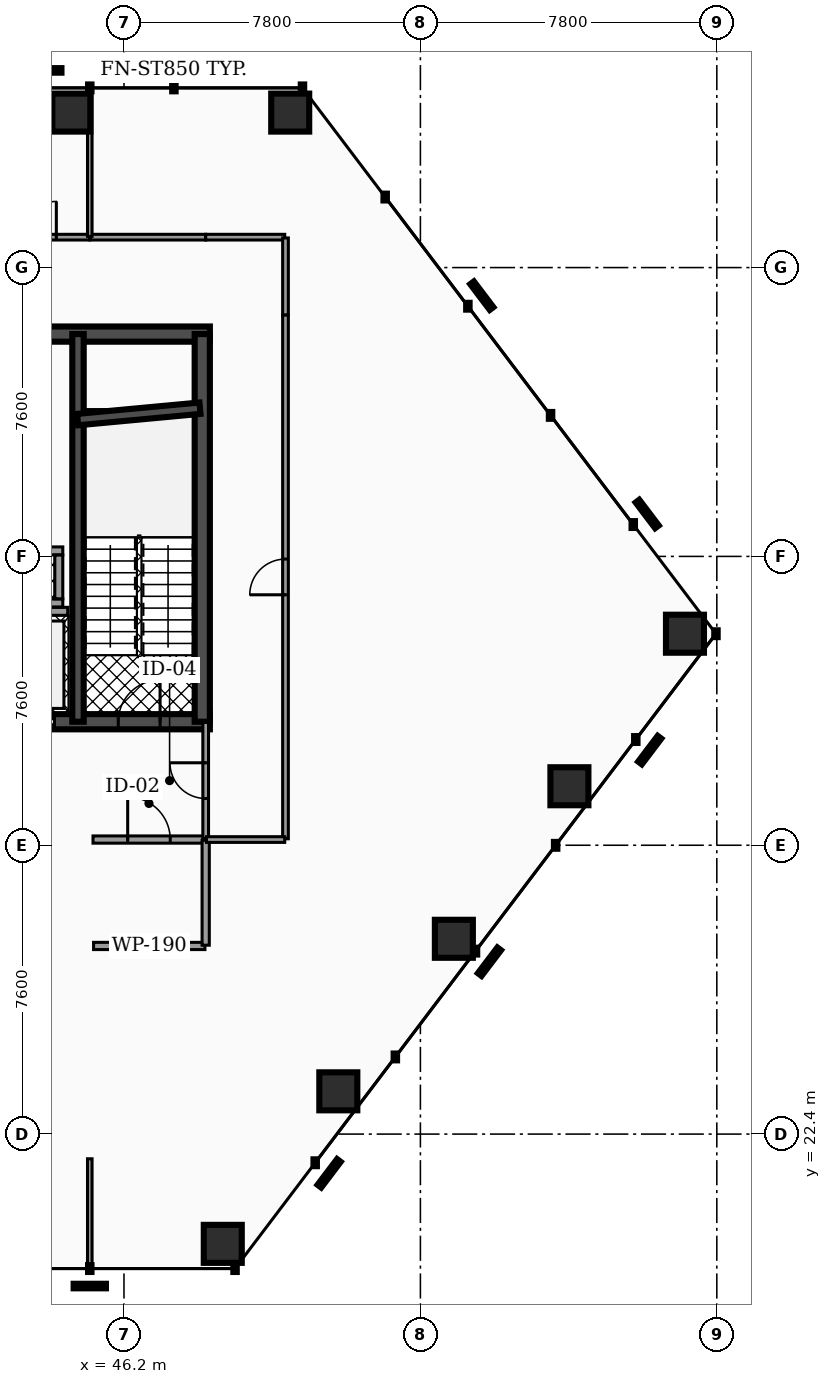
"""IFC4 building model, lengths in metres.
Left out: names, types, materials, properties, quantities, classifications, styles, units other than length and angle.
Written with IfcOpenShell. Run it as: python <this file> out.ifc"""

import sys

from ifc_helpers import new_model, si_unit, direction, frame, frame_2d, origin, origin_2d, place, context, subcontext, project, spatial, rectangle, hollow_rectangle, extrude, element, fill, save


model = new_model("IFC4")
c1 = context("Model", 3, precision=1e-05, world=origin(), true_north=direction((0.0, 1.0)))
c2 = subcontext(c1, "Body", "Model", "MODEL_VIEW")
j1 = project(units=[si_unit("LENGTHUNIT", "METRE"), si_unit("PLANEANGLEUNIT", "RADIAN")], contexts=[c1])
p1 = place(None, origin())
s1 = spatial("IfcSite", under=j1, at=p1, CompositionType="ELEMENT")
p2 = place(p1, origin())
s2 = spatial("IfcBuilding", under=s1, at=p2, CompositionType="ELEMENT")
p3 = place(p2, frame((0.0, 0.0, 52.02)))
s3 = spatial("IfcBuildingStorey", under=s2, at=p3, CompositionType="ELEMENT", Elevation=52.02)
p4 = place(p3, frame((28.4, 43.45, 0.0), z_axis=(0.0, 0.0, 1.0), x_axis=(1.0, 0.0, 0.0)))
e1 = element("IfcWall", 1, at=p4, inside=s3, PredefinedType="SHEAR", context=c2, shape_type="SweptSolid", body=[
    extrude(rectangle(XDim=20.06, YDim=0.4, at=frame_2d((10.03, 0.0))), origin(), (0.0, 0.0, 1.0), 3.82),
])
p5 = place(p3, frame((28.4, 33.25, 0.0), z_axis=(0.0, 0.0, 1.0), x_axis=(1.0, 0.0, 0.0)))
e2 = element("IfcWall", 2, at=p5, inside=s3, PredefinedType="SHEAR", context=c2, shape_type="SweptSolid", body=[
    extrude(rectangle(XDim=20.06, YDim=0.4, at=frame_2d((10.03, 0.0))), origin(), (0.0, 0.0, 1.0), 3.82),
])
p6 = place(p5, frame((4.03, 0.0, 0.0)))
e3 = element("IfcOpeningElement", 3, at=p6, cuts=e2, PredefinedType="OPENING", context=c2, shape_type="SweptSolid", body=[
    extrude(rectangle(XDim=1.1, YDim=2.15, at=frame_2d((0.55, 1.075))), frame((0.0, 0.21, 0.0), z_axis=(0.0, -1.0, 0.0), x_axis=(1.0, 0.0, 0.0)), (0.0, 0.0, 1.0), 0.42),
])
p7 = place(p5, frame((14.87, 0.0, 0.0)))
e4 = element("IfcOpeningElement", 4, at=p7, cuts=e2, PredefinedType="OPENING", context=c2, shape_type="SweptSolid", body=[
    extrude(rectangle(XDim=1.1, YDim=2.15, at=frame_2d((0.55, 1.075))), frame((0.0, 0.21, 0.0), z_axis=(0.0, -1.0, 0.0), x_axis=(1.0, 0.0, 0.0)), (0.0, 0.0, 1.0), 0.42),
])
p8 = place(p5, frame((1.31, 0.0, 0.0)))
e5 = element("IfcOpeningElement", 5, at=p8, cuts=e2, PredefinedType="OPENING", context=c2, shape_type="SweptSolid", body=[
    extrude(rectangle(XDim=1.1, YDim=2.2, at=frame_2d((0.55, 1.1))), frame((0.0, 0.21, 0.0), z_axis=(0.0, -1.0, 0.0), x_axis=(1.0, 0.0, 0.0)), (0.0, 0.0, 1.0), 0.42),
])
p9 = place(p5, frame((9.44, 0.0, 0.0)))
e6 = element("IfcOpeningElement", 6, at=p9, cuts=e2, PredefinedType="OPENING", context=c2, shape_type="SweptSolid", body=[
    extrude(rectangle(XDim=1.12, YDim=2.05, at=frame_2d((0.56, 1.025))), frame((0.0, 0.21, 0.0), z_axis=(0.0, -1.0, 0.0), x_axis=(1.0, 0.0, 0.0)), (0.0, 0.0, 1.0), 0.42),
])
p10 = place(p5, frame((17.65, 0.0, 0.0)))
e7 = element("IfcOpeningElement", 7, at=p10, cuts=e2, PredefinedType="OPENING", context=c2, shape_type="SweptSolid", body=[
    extrude(rectangle(XDim=1.1, YDim=2.2, at=frame_2d((0.55, 1.1))), frame((0.0, 0.21, 0.0), z_axis=(0.0, -1.0, 0.0), x_axis=(1.0, 0.0, 0.0)), (0.0, 0.0, 1.0), 0.42),
])
p11 = place(p3, frame((44.99, 33.25, 0.0), z_axis=(0.0, 0.0, 1.0), x_axis=(0.0, 1.0, 0.0)))
e8 = element("IfcWall", 8, at=p11, inside=s3, PredefinedType="SHEAR", context=c2, shape_type="SweptSolid", body=[
    extrude(rectangle(XDim=10.2, YDim=0.3, at=frame_2d((5.1, 0.0))), origin(), (0.0, 0.0, 1.0), 3.82),
])
p12 = place(p3, frame((48.26, 33.25, 0.0), z_axis=(0.0, 0.0, 1.0), x_axis=(0.0, 1.0, 0.0)))
e9 = element("IfcWall", 9, at=p12, inside=s3, PredefinedType="SHEAR", context=c2, shape_type="SweptSolid", body=[
    extrude(rectangle(XDim=10.2, YDim=0.4, at=frame_2d((5.1, 0.0))), origin(), (0.0, 0.0, 1.0), 3.82),
])
p13 = place(p3, frame((44.98, 41.2, 0.0), z_axis=(0.0, 0.0, 1.0), x_axis=(0.995686468965, 0.09278176286, 0.0)))
e10 = element("IfcWall", 10, at=p13, inside=s3, PredefinedType="SHEAR", context=c2, shape_type="SweptSolid", body=[
    extrude(rectangle(XDim=3.234, YDim=0.3, at=frame_2d((1.617, 0.0))), origin(), (0.0, 0.0, 1.0), 3.82),
])
for number, where, z_axis, x_axis in (
    (11, (50.574, 49.278, 0.0), (0.0, 0.0, 1.0), (1.0, 0.0, 0.0)),
    (12, (44.814, 49.278, 0.0), (0.0, 0.0, 1.0), (1.0, 0.0, 0.0)),
    (13, (48.8, 19.512, 0.0), (0.0, 0.0, 1.0), (1.0, 0.0, 0.0)),
    (14, (51.84, 23.525, 0.0), (0.0, 0.0, 1.0), (1.0, 0.0, 0.0)),
    (15, (54.881, 27.539, 0.0), (0.0, 0.0, 1.0), (1.0, 0.0, 0.0)),
    (16, (57.921, 31.552, 0.0), (0.0, 0.0, 1.0), (1.0, 0.0, 0.0)),
    (17, (60.962, 35.566, 0.0), (0.0, 0.0, 1.0), (1.0, 0.0, 0.0)),
):
    element("IfcColumn", number, at=place(p3, frame(where, z_axis=z_axis, x_axis=x_axis)), inside=s3, PredefinedType="COLUMN", context=c2, shape_type="SweptSolid", body=[
        extrude(hollow_rectangle(XDim=1.0, YDim=1.0, WallThickness=0.05, at=origin_2d()), origin(), (0.0, 0.0, 1.0), 3.82),
    ])
p14 = place(p3, frame((42.92, 36.155, 0.0), z_axis=(0.0, 0.0, 1.0), x_axis=(1.0, 0.0, 0.0)))
e18 = element("IfcWall", 18, at=p14, inside=s3, PredefinedType="SOLIDWALL", context=c2, shape_type="SweptSolid", body=[
    extrude(rectangle(XDim=1.8, YDim=0.21, at=frame_2d((0.9, 0.0))), origin(), (0.0, 0.0, 1.0), 2.792),
])
for number, where, z_axis, x_axis in (
    (19, (42.99, 36.375, 0.0), (0.0, 0.0, 1.0), (1.0, 0.0, 0.0)),
    (20, (42.99, 37.745, 0.0), (0.0, 0.0, 1.0), (1.0, 0.0, 0.0)),
):
    element("IfcWall", number, at=place(p3, frame(where, z_axis=z_axis, x_axis=x_axis)), inside=s3, PredefinedType="SOLIDWALL", context=c2, shape_type="SweptSolid", body=[
        extrude(rectangle(XDim=1.6, YDim=0.21, at=frame_2d((0.8, 0.0))), origin(), (0.0, 0.0, 1.0), 3.82),
    ])
p15 = place(p3, frame((44.485, 36.485, 0.0), z_axis=(0.0, 0.0, 1.0), x_axis=(0.0, 1.0, 0.0)))
e21 = element("IfcWall", 21, at=p15, inside=s3, PredefinedType="SOLIDWALL", context=c2, shape_type="SweptSolid", body=[
    extrude(rectangle(XDim=1.15, YDim=0.21, at=frame_2d((0.575, 0.0))), origin(), (0.0, 0.0, 1.0), 3.82),
])
p16 = place(p3, frame((45.385, 30.15, 0.0), z_axis=(0.0, 0.0, 1.0), x_axis=(1.0, 0.0, 0.0)))
e22 = element("IfcWall", 22, at=p16, inside=s3, PredefinedType="PARTITIONING", context=c2, shape_type="SweptSolid", body=[
    extrude(rectangle(XDim=2.945, YDim=0.19, at=frame_2d((1.473, 0.0))), origin(), (0.0, 0.0, 1.0), 2.777),
])
p17 = place(p16, frame((0.913, 0.0, 0.0)))
e23 = element("IfcOpeningElement", 23, at=p17, cuts=e22, PredefinedType="OPENING", context=c2, shape_type="SweptSolid", body=[
    extrude(rectangle(XDim=1.12, YDim=2.05, at=frame_2d((0.56, 1.025))), frame((0.0, 0.105, 0.0), z_axis=(0.0, -1.0, 0.0), x_axis=(1.0, 0.0, 0.0)), (0.0, 0.0, 1.0), 0.21),
])
p18 = place(p3, frame((48.35, 30.17, 0.0), z_axis=(0.0, 0.0, 1.0), x_axis=(0.0, 1.0, 0.0)))
e24 = element("IfcWall", 24, at=p18, inside=s3, PredefinedType="PARTITIONING", context=c2, shape_type="SweptSolid", body=[
    extrude(rectangle(XDim=3.06, YDim=0.15, at=frame_2d((1.53, 0.0))), origin(), (0.0, 0.0, 1.0), 2.777),
])
p19 = place(p18, frame((1.06, 0.0, 0.0)))
e25 = element("IfcOpeningElement", 25, at=p19, cuts=e24, PredefinedType="OPENING", context=c2, shape_type="SweptSolid", body=[
    extrude(rectangle(XDim=0.94, YDim=2.05, at=frame_2d((0.47, 1.025))), frame((0.0, 0.085, 0.0), z_axis=(0.0, -1.0, 0.0), x_axis=(1.0, 0.0, 0.0)), (0.0, 0.0, 1.0), 0.17),
])
p20 = place(p3, frame((45.4, 27.35, 0.0), z_axis=(0.0, 0.0, 1.0), x_axis=(1.0, 0.0, 0.0)))
e26 = element("IfcWall", 26, at=p20, inside=s3, PredefinedType="PARTITIONING", context=c2, shape_type="SweptSolid", body=[
    extrude(rectangle(XDim=2.93, YDim=0.19, at=frame_2d((1.465, 0.0))), origin(), (0.0, 0.0, 1.0), 2.777),
])
p21 = place(p3, frame((48.35, 27.37, 0.0), z_axis=(0.0, 0.0, 1.0), x_axis=(0.0, 1.0, 0.0)))
e27 = element("IfcWall", 27, at=p21, inside=s3, PredefinedType="PARTITIONING", context=c2, shape_type="SweptSolid", body=[
    extrude(rectangle(XDim=2.76, YDim=0.19, at=frame_2d((1.38, 0.0))), origin(), (0.0, 0.0, 1.0), 2.777),
])
p22 = place(p3, frame((45.305, 46.0, 0.0), z_axis=(0.0, 0.0, 1.0), x_axis=(1.0, 0.0, 0.0)))
e28 = element("IfcWall", 28, at=p22, inside=s3, PredefinedType="PARTITIONING", context=c2, shape_type="SweptSolid", body=[
    extrude(rectangle(XDim=3.045, YDim=0.15, at=frame_2d((1.522, 0.0))), origin(), (0.0, 0.0, 1.0), 2.777),
])
p23 = place(p3, frame((48.35, 46.0, 0.0), z_axis=(0.0, 0.0, 1.0), x_axis=(1.0, 0.0, 0.0)))
e29 = element("IfcWall", 29, at=p23, inside=s3, PredefinedType="PARTITIONING", context=c2, shape_type="SweptSolid", body=[
    extrude(rectangle(XDim=2.08, YDim=0.15, at=frame_2d((1.04, 0.0))), origin(), (0.0, 0.0, 1.0), 2.777),
])
p24 = place(p3, frame((50.45, 43.95, 0.0), z_axis=(0.0, 0.0, 1.0), x_axis=(0.0, 1.0, 0.0)))
e30 = element("IfcWall", 30, at=p24, inside=s3, PredefinedType="PARTITIONING", context=c2, shape_type="SweptSolid", body=[
    extrude(rectangle(XDim=2.03, YDim=0.15, at=frame_2d((1.015, 0.0))), origin(), (0.0, 0.0, 1.0), 2.777),
])
p25 = place(p3, frame((50.45, 30.17, 0.0), z_axis=(0.0, 0.0, 1.0), x_axis=(0.0, 1.0, 0.0)))
e31 = element("IfcWall", 31, at=p25, inside=s3, PredefinedType="PARTITIONING", context=c2, shape_type="SweptSolid", body=[
    extrude(rectangle(XDim=13.78, YDim=0.15, at=frame_2d((6.89, 0.0))), origin(), (0.0, 0.0, 1.0), 2.777),
])
p26 = place(p25, frame((6.42, 0.0, 0.0)))
e32 = element("IfcOpeningElement", 32, at=p26, cuts=e31, PredefinedType="OPENING", context=c2, shape_type="SweptSolid", body=[
    extrude(rectangle(XDim=0.94, YDim=2.05, at=frame_2d((0.47, 1.025))), frame((0.0, 0.085, 0.0), z_axis=(0.0, -1.0, 0.0), x_axis=(1.0, 0.0, 0.0)), (0.0, 0.0, 1.0), 0.17),
])
p27 = place(p3, frame((48.37, 30.15, 0.0), z_axis=(0.0, 0.0, 1.0), x_axis=(1.0, 0.0, 0.0)))
e33 = element("IfcWall", 33, at=p27, inside=s3, PredefinedType="PARTITIONING", context=c2, shape_type="SweptSolid", body=[
    extrude(rectangle(XDim=2.06, YDim=0.15, at=frame_2d((1.03, 0.0))), origin(), (0.0, 0.0, 1.0), 2.777),
])
p28 = place(p3, frame((42.605, 46.0, 0.0), z_axis=(0.0, 0.0, 1.0), x_axis=(1.0, 0.0, 0.0)))
e34 = element("IfcWall", 34, at=p28, inside=s3, PredefinedType="PARTITIONING", context=c2, shape_type="SweptSolid", body=[
    extrude(rectangle(XDim=2.69, YDim=0.15, at=frame_2d((1.345, 0.0))), origin(), (0.0, 0.0, 1.0), 2.777),
])
p29 = place(p28, frame((0.875, 0.0, 0.0)))
e35 = element("IfcOpeningElement", 35, at=p29, cuts=e34, PredefinedType="OPENING", context=c2, shape_type="SweptSolid", body=[
    extrude(rectangle(XDim=0.94, YDim=2.05, at=frame_2d((0.47, 1.025))), frame((0.0, 0.085, 0.0), z_axis=(0.0, -1.0, 0.0), x_axis=(1.0, 0.0, 0.0)), (0.0, 0.0, 1.0), 0.17),
])
p30 = place(p3, frame((45.3, 18.877, 0.0), z_axis=(0.0, 0.0, 1.0), x_axis=(0.0, 1.0, 0.0)))
e36 = element("IfcWall", 36, at=p30, inside=s3, PredefinedType="PARTITIONING", context=c2, shape_type="SweptSolid", body=[
    extrude(rectangle(XDim=2.873, YDim=0.12, at=frame_2d((1.437, 0.0))), origin(), (0.0, 0.0, 1.0), 2.777),
])
p31 = place(p3, frame((45.3, 46.02, 0.0), z_axis=(0.0, 0.0, 1.0), x_axis=(0.0, 1.0, 0.0)))
e37 = element("IfcWall", 37, at=p31, inside=s3, PredefinedType="PARTITIONING", context=c2, shape_type="SweptSolid", body=[
    extrude(rectangle(XDim=3.893, YDim=0.12, at=frame_2d((1.946, 0.0))), origin(), (0.0, 0.0, 1.0), 2.777),
])
p32 = place(p7, origin())
e38 = element("IfcDoor", 38, at=p32, inside=s3, OperationType="SLIDING_TO_RIGHT", PredefinedType="DOOR", context=c2, shape_type="SweptSolid", body=[
    extrude(rectangle(XDim=1.1, YDim=2.15, at=frame_2d((0.55, 1.075))), frame((0.0, 0.025, 0.0), z_axis=(0.0, -1.0, 0.0), x_axis=(1.0, 0.0, 0.0)), (0.0, 0.0, 1.0), 0.05),
])
fill(e4, e38)
p33 = place(p10, origin())
e39 = element("IfcDoor", 39, at=p33, inside=s3, OperationType="SINGLE_SWING_RIGHT", PredefinedType="DOOR", context=c2, shape_type="SweptSolid", body=[
    extrude(rectangle(XDim=1.1, YDim=2.2, at=frame_2d((0.55, 1.1))), frame((0.0, 0.025, 0.0), z_axis=(0.0, -1.0, 0.0), x_axis=(1.0, 0.0, 0.0)), (0.0, 0.0, 1.0), 0.05),
])
fill(e7, e39)
p34 = place(p17, origin())
e40 = element("IfcDoor", 40, at=p34, inside=s3, OperationType="SINGLE_SWING_LEFT", PredefinedType="DOOR", context=c2, shape_type="SweptSolid", body=[
    extrude(rectangle(XDim=1.12, YDim=2.05, at=frame_2d((0.56, 1.025))), frame((0.0, 0.025, 0.0), z_axis=(0.0, -1.0, 0.0), x_axis=(1.0, 0.0, 0.0)), (0.0, 0.0, 1.0), 0.05),
])
fill(e23, e40)
p35 = place(p19, origin())
e41 = element("IfcDoor", 41, at=p35, inside=s3, OperationType="SINGLE_SWING_RIGHT", PredefinedType="DOOR", context=c2, shape_type="SweptSolid", body=[
    extrude(rectangle(XDim=0.94, YDim=2.05, at=frame_2d((0.47, 1.025))), frame((0.0, 0.025, 0.0), z_axis=(0.0, -1.0, 0.0), x_axis=(1.0, 0.0, 0.0)), (0.0, 0.0, 1.0), 0.05),
])
fill(e25, e41)
p36 = place(p26, origin())
e42 = element("IfcDoor", 42, at=p36, inside=s3, OperationType="SINGLE_SWING_LEFT", PredefinedType="DOOR", context=c2, shape_type="SweptSolid", body=[
    extrude(rectangle(XDim=0.94, YDim=2.05, at=frame_2d((0.47, 1.025))), frame((0.0, 0.025, 0.0), z_axis=(0.0, -1.0, 0.0), x_axis=(1.0, 0.0, 0.0)), (0.0, 0.0, 1.0), 0.05),
])
fill(e32, e42)
p37 = place(p29, origin())
e43 = element("IfcDoor", 43, at=p37, inside=s3, OperationType="SINGLE_SWING_RIGHT", PredefinedType="DOOR", context=c2, shape_type="SweptSolid", body=[
    extrude(rectangle(XDim=0.94, YDim=2.05, at=frame_2d((0.47, 1.025))), frame((0.0, 0.025, 0.0), z_axis=(0.0, -1.0, 0.0), x_axis=(1.0, 0.0, 0.0)), (0.0, 0.0, 1.0), 0.05),
])
fill(e35, e43)
save(model, sys.argv[1])
